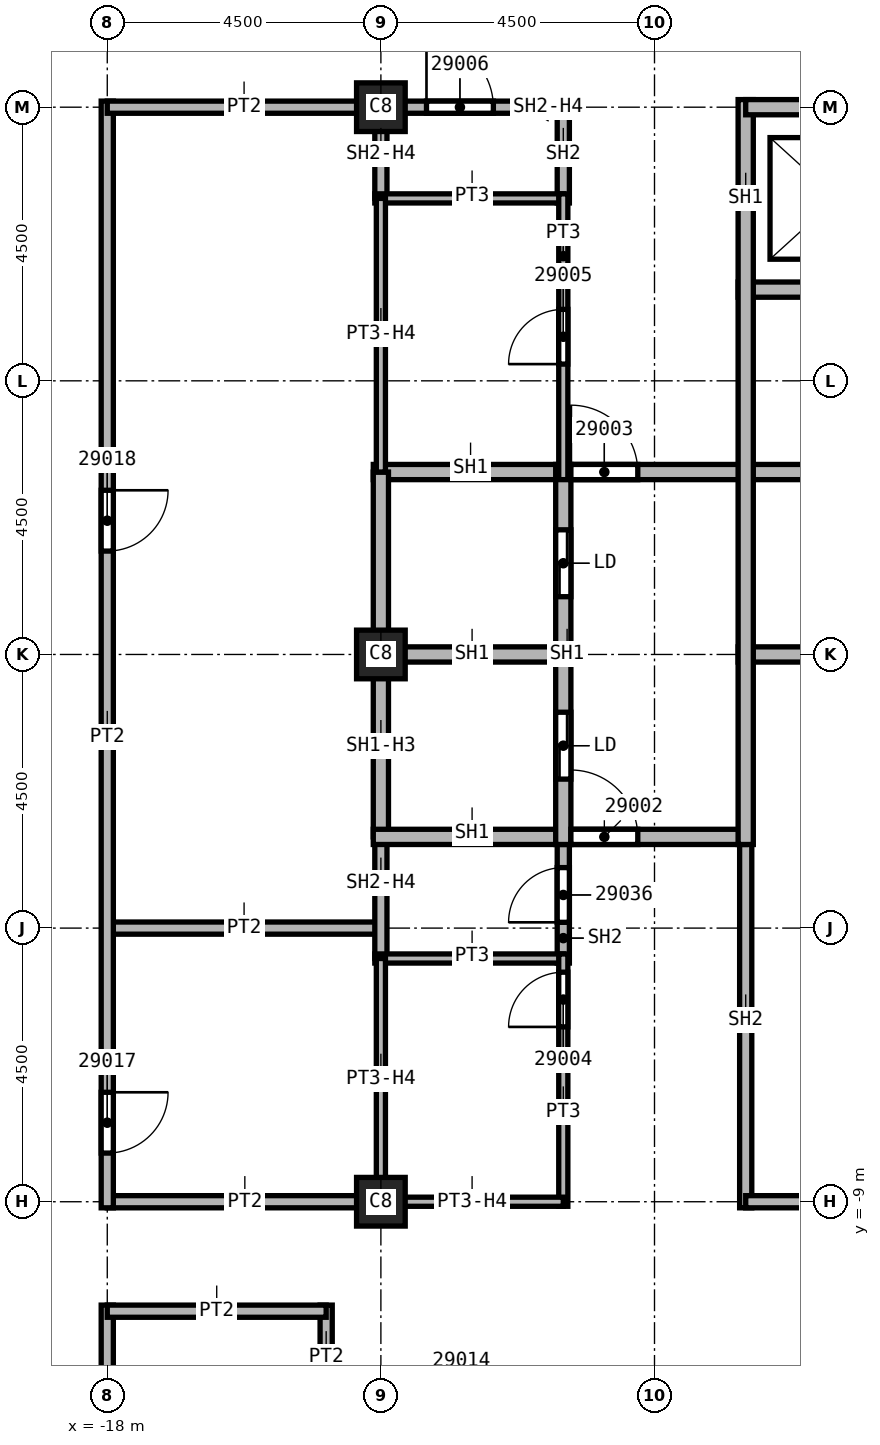
"""IFC4 building model, lengths in metres.
Left out: names, types, materials, properties, quantities, classifications, styles, units other than length and angle.
Written with IfcOpenShell. Run it as: python <this file> out.ifc"""

import sys

from ifc_helpers import new_model, si_unit, direction, frame, frame_2d, origin, origin_2d, place, context, subcontext, project, spatial, rectangle, extrude, element, fill, save


model = new_model("IFC4")
c1 = context("Model", 3, precision=1e-05, world=origin(), true_north=direction((0.0, 1.0)))
c2 = subcontext(c1, "Body", "Model", "MODEL_VIEW")
j1 = project(units=[si_unit("LENGTHUNIT", "METRE"), si_unit("PLANEANGLEUNIT", "RADIAN")], contexts=[c1])
p1 = place(None, origin())
s1 = spatial("IfcSite", under=j1, at=p1, CompositionType="ELEMENT")
p2 = place(p1, origin())
s2 = spatial("IfcBuilding", under=s1, at=p2, CompositionType="ELEMENT")
p3 = place(p2, frame((0.0, 0.0, 294.0)))
s3 = spatial("IfcBuildingStorey", under=s2, at=p3, CompositionType="ELEMENT", Elevation=294.0)
for number, where, z_axis, x_axis in (
    (1, (-13.5, 0.0, 0.0), (0.0, 0.0, 1.0), (1.0, 0.0, 0.0)),
    (2, (-13.5, 9.0, 0.0), (0.0, 0.0, 1.0), (1.0, 0.0, 0.0)),
    (3, (-13.5, -9.0, 0.0), (0.0, 0.0, 1.0), (1.0, 0.0, 0.0)),
):
    element("IfcColumn", number, at=place(p3, frame(where, z_axis=z_axis, x_axis=x_axis)), inside=s3, PredefinedType="COLUMN", context=c2, shape_type="SweptSolid", body=[
        extrude(rectangle(XDim=0.8, YDim=0.8, at=origin_2d()), origin(), (0.0, 0.0, 1.0), 5.74),
    ])
p4 = place(p3, frame((-18.0, -10.7, 0.0), z_axis=(0.0, 0.0, 1.0), x_axis=(0.0, -1.0, 0.0)))
e4 = element("IfcWall", 4, at=p4, inside=s3, PredefinedType="PARTITIONING", context=c2, shape_type="SweptSolid", body=[
    extrude(rectangle(XDim=11.2, YDim=0.2, at=frame_2d((5.6, 0.0))), origin(), (0.0, 0.0, 1.0), 5.74),
])
for number, where, z_axis, x_axis in (
    (5, (-18.0, -9.0, 0.0), (0.0, 0.0, 1.0), (1.0, 0.0, 0.0)),
    (6, (-18.0, -4.5, 0.0), (0.0, 0.0, 1.0), (1.0, 0.0, 0.0)),
):
    element("IfcWall", number, at=place(p3, frame(where, z_axis=z_axis, x_axis=x_axis)), inside=s3, PredefinedType="PARTITIONING", context=c2, shape_type="SweptSolid", body=[
        extrude(rectangle(XDim=4.5, YDim=0.2, at=frame_2d((2.25, 0.0))), origin(), (0.0, 0.0, 1.0), 5.74),
    ])
p5 = place(p3, frame((-18.0, 9.1, 0.0), z_axis=(0.0, 0.0, 1.0), x_axis=(0.0, -1.0, 0.0)))
e7 = element("IfcWall", 7, at=p5, inside=s3, PredefinedType="PARTITIONING", context=c2, shape_type="SweptSolid", body=[
    extrude(rectangle(XDim=18.2, YDim=0.2, at=frame_2d((9.1, 0.0))), origin(), (0.0, 0.0, 1.0), 5.74),
])
p6 = place(p5, frame((16.3, 0.0, 0.0)))
e8 = element("IfcOpeningElement", 8, at=p6, cuts=e7, PredefinedType="OPENING", context=c2, shape_type="SweptSolid", body=[
    extrude(rectangle(XDim=1.0, YDim=2.1, at=frame_2d((0.5, 1.05))), frame((0.0, 0.1, 0.0), z_axis=(0.0, -1.0, 0.0), x_axis=(1.0, 0.0, 0.0)), (0.0, 0.0, 1.0), 0.2),
])
p7 = place(p5, frame((6.4, 0.0, 0.0)))
e9 = element("IfcOpeningElement", 9, at=p7, cuts=e7, PredefinedType="OPENING", context=c2, shape_type="SweptSolid", body=[
    extrude(rectangle(XDim=1.0, YDim=2.1, at=frame_2d((0.5, 1.05))), frame((0.0, 0.1, 0.0), z_axis=(0.0, -1.0, 0.0), x_axis=(1.0, 0.0, 0.0)), (0.0, 0.0, 1.0), 0.2),
])
p8 = place(p3, frame((-14.4, -12.3, 0.0), z_axis=(0.0, 0.0, 1.0), x_axis=(0.0, 1.0, 0.0)))
e10 = element("IfcWall", 10, at=p8, inside=s3, PredefinedType="PARTITIONING", context=c2, shape_type="SweptSolid", body=[
    extrude(rectangle(XDim=1.6, YDim=0.2, at=frame_2d((0.8, 0.0))), origin(), (0.0, 0.0, 1.0), 5.74),
])
p9 = place(p3, frame((-14.4, -10.8, 0.0), z_axis=(0.0, 0.0, 1.0), x_axis=(-1.0, 0.0, 0.0)))
e11 = element("IfcWall", 11, at=p9, inside=s3, PredefinedType="PARTITIONING", context=c2, shape_type="SweptSolid", body=[
    extrude(rectangle(XDim=3.6, YDim=0.2, at=frame_2d((1.8, 0.0))), origin(), (0.0, 0.0, 1.0), 5.74),
])
p10 = place(p3, frame((-13.5, 9.0, 0.0), z_axis=(0.0, 0.0, 1.0), x_axis=(-1.0, 0.0, 0.0)))
e12 = element("IfcWall", 12, at=p10, inside=s3, PredefinedType="PARTITIONING", context=c2, shape_type="SweptSolid", body=[
    extrude(rectangle(XDim=4.5, YDim=0.2, at=frame_2d((2.25, 0.0))), origin(), (0.0, 0.0, 1.0), 5.74),
])
p11 = place(p3, frame((-13.6, 9.0, 0.0), z_axis=(0.0, 0.0, 1.0), x_axis=(1.0, 0.0, 0.0)))
e13 = element("IfcWall", 13, at=p11, inside=s3, PredefinedType="SOLIDWALL", context=c2, shape_type="SweptSolid", body=[
    extrude(rectangle(XDim=3.1, YDim=0.2, at=frame_2d((1.55, 0.0))), origin(), (0.0, 0.0, 1.0), 5.062),
])
p12 = place(p11, frame((0.85, 0.0, 0.0)))
e14 = element("IfcOpeningElement", 14, at=p12, cuts=e13, PredefinedType="OPENING", context=c2, shape_type="SweptSolid", body=[
    extrude(rectangle(XDim=1.1, YDim=2.1, at=frame_2d((0.55, 1.05))), frame((0.0, 0.1, 0.0), z_axis=(0.0, -1.0, 0.0), x_axis=(1.0, 0.0, 0.0)), (0.0, 0.0, 1.0), 0.2),
])
p13 = place(p3, frame((-13.5, -5.0, 0.0), z_axis=(0.0, 0.0, 1.0), x_axis=(0.0, 1.0, 0.0)))
e15 = element("IfcWall", 15, at=p13, inside=s3, PredefinedType="SOLIDWALL", context=c2, shape_type="SweptSolid", body=[
    extrude(rectangle(XDim=2.0, YDim=0.2, at=frame_2d((1.0, 0.0))), origin(), (0.0, 0.0, 1.0), 5.062),
])
p14 = place(p3, frame((-13.5, 7.5, 0.0), z_axis=(0.0, 0.0, 1.0), x_axis=(0.0, 1.0, 0.0)))
e16 = element("IfcWall", 16, at=p14, inside=s3, PredefinedType="SOLIDWALL", context=c2, shape_type="SweptSolid", body=[
    extrude(rectangle(XDim=1.6, YDim=0.2, at=frame_2d((0.8, 0.0))), origin(), (0.0, 0.0, 1.0), 5.062),
])
p15 = place(p3, frame((-10.5, -5.075, 0.0), z_axis=(0.0, 0.0, 1.0), x_axis=(0.0, 1.0, 0.0)))
e17 = element("IfcWall", 17, at=p15, inside=s3, PredefinedType="SOLIDWALL", context=c2, shape_type="SweptSolid", body=[
    extrude(rectangle(XDim=2.2, YDim=0.2, at=frame_2d((1.1, 0.0))), origin(), (0.0, 0.0, 1.0), 5.74),
])
p16 = place(p15, frame((0.67, 0.0, 0.0)))
e18 = element("IfcOpeningElement", 18, at=p16, cuts=e17, PredefinedType="OPENING", context=c2, shape_type="SweptSolid", body=[
    extrude(rectangle(XDim=0.9, YDim=2.1, at=frame_2d((0.45, 1.05))), frame((0.0, 0.1, 0.0), z_axis=(0.0, -1.0, 0.0), x_axis=(1.0, 0.0, 0.0)), (0.0, 0.0, 1.0), 0.2),
])
p17 = place(p3, frame((-10.5, 7.425, 0.0), z_axis=(0.0, 0.0, 1.0), x_axis=(0.0, 1.0, 0.0)))
e19 = element("IfcWall", 19, at=p17, inside=s3, PredefinedType="SOLIDWALL", context=c2, shape_type="SweptSolid", body=[
    extrude(rectangle(XDim=1.675, YDim=0.2, at=frame_2d((0.837, 0.0))), origin(), (0.0, 0.0, 1.0), 5.74),
])
p18 = place(p3, frame((-7.5, -9.1, 0.0), z_axis=(0.0, 0.0, 1.0), x_axis=(0.0, 1.0, 0.0)))
e20 = element("IfcWall", 20, at=p18, inside=s3, PredefinedType="SOLIDWALL", context=c2, shape_type="SweptSolid", body=[
    extrude(rectangle(XDim=6.225, YDim=0.2, at=frame_2d((3.113, 0.0))), origin(), (0.0, 0.0, 1.0), 5.74),
])
p19 = place(p3, frame((-4.5, -9.0, 0.0), z_axis=(0.0, 0.0, 1.0), x_axis=(-1.0, 0.0, 0.0)))
e21 = element("IfcWall", 21, at=p19, inside=s3, PredefinedType="SOLIDWALL", context=c2, shape_type="SweptSolid", body=[
    extrude(rectangle(XDim=3.0, YDim=0.2, at=frame_2d((1.5, 0.0))), origin(), (0.0, 0.0, 1.0), 5.062),
])
p20 = place(p3, frame((-13.625, 0.0, 0.0), z_axis=(0.0, 0.0, 1.0), x_axis=(1.0, 0.0, 0.0)))
e22 = element("IfcWall", 22, at=p20, inside=s3, PredefinedType="SOLIDWALL", context=c2, shape_type="SweptSolid", body=[
    extrude(rectangle(XDim=3.125, YDim=0.25, at=frame_2d((1.562, 0.0))), origin(), (0.0, 0.0, 1.0), 5.74),
])
p21 = place(p3, frame((-13.625, 3.0, 0.0), z_axis=(0.0, 0.0, 1.0), x_axis=(1.0, 0.0, 0.0)))
e23 = element("IfcWall", 23, at=p21, inside=s3, PredefinedType="SOLIDWALL", context=c2, shape_type="SweptSolid", body=[
    extrude(rectangle(XDim=9.25, YDim=0.25, at=frame_2d((4.625, 0.0))), origin(), (0.0, 0.0, 1.0), 5.74),
])
p22 = place(p21, frame((3.25, 0.0, 0.0)))
e24 = element("IfcOpeningElement", 24, at=p22, cuts=e23, PredefinedType="OPENING", context=c2, shape_type="SweptSolid", body=[
    extrude(rectangle(XDim=1.1, YDim=2.1, at=frame_2d((0.55, 1.05))), frame((0.0, 0.125, 0.0), z_axis=(0.0, -1.0, 0.0), x_axis=(1.0, 0.0, 0.0)), (0.0, 0.0, 1.0), 0.25),
])
p23 = place(p3, frame((-13.5, -3.0, 0.0), z_axis=(0.0, 0.0, 1.0), x_axis=(0.0, 1.0, 0.0)))
e25 = element("IfcWall", 25, at=p23, inside=s3, PredefinedType="SOLIDWALL", context=c2, shape_type="SweptSolid", body=[
    extrude(rectangle(XDim=6.0, YDim=0.25, at=frame_2d((3.0, 0.0))), origin(), (0.0, 0.0, 1.0), 5.062),
])
p24 = place(p3, frame((-13.625, -3.0, 0.0), z_axis=(0.0, 0.0, 1.0), x_axis=(1.0, 0.0, 0.0)))
e26 = element("IfcWall", 26, at=p24, inside=s3, PredefinedType="SOLIDWALL", context=c2, shape_type="SweptSolid", body=[
    extrude(rectangle(XDim=6.125, YDim=0.25, at=frame_2d((3.062, 0.0))), origin(), (0.0, 0.0, 1.0), 5.74),
])
p25 = place(p24, frame((3.25, 0.0, 0.0)))
e27 = element("IfcOpeningElement", 27, at=p25, cuts=e26, PredefinedType="OPENING", context=c2, shape_type="SweptSolid", body=[
    extrude(rectangle(XDim=1.1, YDim=2.1, at=frame_2d((0.55, 1.05))), frame((0.0, 0.125, 0.0), z_axis=(0.0, -1.0, 0.0), x_axis=(1.0, 0.0, 0.0)), (0.0, 0.0, 1.0), 0.25),
])
p26 = place(p3, frame((-10.5, -3.125, 0.0), z_axis=(0.0, 0.0, 1.0), x_axis=(0.0, 1.0, 0.0)))
e28 = element("IfcWall", 28, at=p26, inside=s3, PredefinedType="SOLIDWALL", context=c2, shape_type="SweptSolid", body=[
    extrude(rectangle(XDim=6.25, YDim=0.25, at=frame_2d((3.125, 0.0))), origin(), (0.0, 0.0, 1.0), 5.74),
])
p27 = place(p26, frame((1.075, 0.0, 0.0)))
e29 = element("IfcOpeningElement", 29, at=p27, cuts=e28, PredefinedType="OPENING", context=c2, shape_type="SweptSolid", body=[
    extrude(rectangle(XDim=1.1, YDim=2.1, at=frame_2d((0.55, 1.05))), frame((0.0, 0.125, 0.0), z_axis=(0.0, -1.0, 0.0), x_axis=(1.0, 0.0, 0.0)), (0.0, 0.0, 1.0), 0.25),
])
p28 = place(p26, frame((4.075, 0.0, 0.0)))
e30 = element("IfcOpeningElement", 30, at=p28, cuts=e28, PredefinedType="OPENING", context=c2, shape_type="SweptSolid", body=[
    extrude(rectangle(XDim=1.1, YDim=2.1, at=frame_2d((0.55, 1.05))), frame((0.0, 0.125, 0.0), z_axis=(0.0, -1.0, 0.0), x_axis=(1.0, 0.0, 0.0)), (0.0, 0.0, 1.0), 0.25),
])
for number, where, z_axis, x_axis in (
    (31, (-7.625, 0.0, 0.0), (0.0, 0.0, 1.0), (1.0, 0.0, 0.0)),
    (32, (-7.625, 6.0, 0.0), (0.0, 0.0, 1.0), (1.0, 0.0, 0.0)),
):
    element("IfcWall", number, at=place(p3, frame(where, z_axis=z_axis, x_axis=x_axis)), inside=s3, PredefinedType="SOLIDWALL", context=c2, shape_type="SweptSolid", body=[
        extrude(rectangle(XDim=3.25, YDim=0.25, at=frame_2d((1.625, 0.0))), origin(), (0.0, 0.0, 1.0), 5.74),
    ])
p29 = place(p3, frame((-7.5, -3.125, 0.0), z_axis=(0.0, 0.0, 1.0), x_axis=(0.0, 1.0, 0.0)))
e33 = element("IfcWall", 33, at=p29, inside=s3, PredefinedType="SOLIDWALL", context=c2, shape_type="SweptSolid", body=[
    extrude(rectangle(XDim=12.25, YDim=0.25, at=frame_2d((6.125, 0.0))), origin(), (0.0, 0.0, 1.0), 5.74),
])
p30 = place(p3, frame((-7.5, 9.0, 0.0), z_axis=(0.0, 0.0, 1.0), x_axis=(1.0, 0.0, 0.0)))
e34 = element("IfcWall", 34, at=p30, inside=s3, PredefinedType="SOLIDWALL", context=c2, shape_type="SweptSolid", body=[
    extrude(rectangle(XDim=3.0, YDim=0.25, at=frame_2d((1.5, 0.0))), origin(), (0.0, 0.0, 1.0), 5.062),
])
for number, where, z_axis, x_axis in (
    (35, (-13.6, -5.0, 0.0), (0.0, 0.0, 1.0), (1.0, 0.0, 0.0)),
    (36, (-13.6, 7.5, 0.0), (0.0, 0.0, 1.0), (1.0, 0.0, 0.0)),
):
    element("IfcWall", number, at=place(p3, frame(where, z_axis=z_axis, x_axis=x_axis)), inside=s3, PredefinedType="PARTITIONING", context=c2, shape_type="SweptSolid", body=[
        extrude(rectangle(XDim=3.1, YDim=0.15, at=frame_2d((1.55, 0.0))), origin(), (0.0, 0.0, 1.0), 5.74),
    ])
p31 = place(p3, frame((-13.5, -9.1, 0.0), z_axis=(0.0, 0.0, 1.0), x_axis=(0.0, 1.0, 0.0)))
e37 = element("IfcWall", 37, at=p31, inside=s3, PredefinedType="PARTITIONING", context=c2, shape_type="SweptSolid", body=[
    extrude(rectangle(XDim=4.1, YDim=0.15, at=frame_2d((2.05, 0.0))), origin(), (0.0, 0.0, 1.0), 5.062),
])
p32 = place(p3, frame((-13.5, 3.0, 0.0), z_axis=(0.0, 0.0, 1.0), x_axis=(0.0, 1.0, 0.0)))
e38 = element("IfcWall", 38, at=p32, inside=s3, PredefinedType="PARTITIONING", context=c2, shape_type="SweptSolid", body=[
    extrude(rectangle(XDim=4.5, YDim=0.15, at=frame_2d((2.25, 0.0))), origin(), (0.0, 0.0, 1.0), 5.062),
])
p33 = place(p3, frame((-10.5, -9.075, 0.0), z_axis=(0.0, 0.0, 1.0), x_axis=(0.0, 1.0, 0.0)))
e39 = element("IfcWall", 39, at=p33, inside=s3, PredefinedType="PARTITIONING", context=c2, shape_type="SweptSolid", body=[
    extrude(rectangle(XDim=4.15, YDim=0.15, at=frame_2d((2.075, 0.0))), origin(), (0.0, 0.0, 1.0), 5.74),
])
p34 = place(p33, frame((2.95, 0.0, 0.0)))
e40 = element("IfcOpeningElement", 40, at=p34, cuts=e39, PredefinedType="OPENING", context=c2, shape_type="SweptSolid", body=[
    extrude(rectangle(XDim=0.9, YDim=2.1, at=frame_2d((0.45, 1.05))), frame((0.0, 0.075, 0.0), z_axis=(0.0, -1.0, 0.0), x_axis=(1.0, 0.0, 0.0)), (0.0, 0.0, 1.0), 0.15),
])
p35 = place(p3, frame((-10.5, -9.0, 0.0), z_axis=(0.0, 0.0, 1.0), x_axis=(-1.0, 0.0, 0.0)))
e41 = element("IfcWall", 41, at=p35, inside=s3, PredefinedType="PARTITIONING", context=c2, shape_type="SweptSolid", body=[
    extrude(rectangle(XDim=3.075, YDim=0.15, at=frame_2d((1.538, 0.0))), origin(), (0.0, 0.0, 1.0), 5.062),
])
p36 = place(p3, frame((-10.5, 2.875, 0.0), z_axis=(0.0, 0.0, 1.0), x_axis=(0.0, 1.0, 0.0)))
e42 = element("IfcWall", 42, at=p36, inside=s3, PredefinedType="PARTITIONING", context=c2, shape_type="SweptSolid", body=[
    extrude(rectangle(XDim=4.7, YDim=0.15, at=frame_2d((2.35, 0.0))), origin(), (0.0, 0.0, 1.0), 5.74),
])
p37 = place(p36, frame((1.9, 0.0, 0.0)))
e43 = element("IfcOpeningElement", 43, at=p37, cuts=e42, PredefinedType="OPENING", context=c2, shape_type="SweptSolid", body=[
    extrude(rectangle(XDim=0.9, YDim=2.1, at=frame_2d((0.45, 1.05))), frame((0.0, 0.075, 0.0), z_axis=(0.0, -1.0, 0.0), x_axis=(1.0, 0.0, 0.0)), (0.0, 0.0, 1.0), 0.15),
])
p38 = place(p25, origin())
e44 = element("IfcDoor", 44, at=p38, inside=s3, OperationType="SINGLE_SWING_LEFT", PredefinedType="DOOR", context=c2, shape_type="SweptSolid", body=[
    extrude(rectangle(XDim=1.1, YDim=2.1, at=frame_2d((0.55, 1.05))), frame((0.0, 0.025, 0.0), z_axis=(0.0, -1.0, 0.0), x_axis=(1.0, 0.0, 0.0)), (0.0, 0.0, 1.0), 0.05),
])
fill(e27, e44)
p39 = place(p22, origin())
e45 = element("IfcDoor", 45, at=p39, inside=s3, OperationType="SINGLE_SWING_RIGHT", PredefinedType="DOOR", context=c2, shape_type="SweptSolid", body=[
    extrude(rectangle(XDim=1.1, YDim=2.1, at=frame_2d((0.55, 1.05))), frame((0.0, 0.025, 0.0), z_axis=(0.0, -1.0, 0.0), x_axis=(1.0, 0.0, 0.0)), (0.0, 0.0, 1.0), 0.05),
])
fill(e24, e45)
p40 = place(p34, origin())
e46 = element("IfcDoor", 46, at=p40, inside=s3, OperationType="SINGLE_SWING_LEFT", PredefinedType="DOOR", context=c2, shape_type="SweptSolid", body=[
    extrude(rectangle(XDim=0.9, YDim=2.1, at=frame_2d((0.45, 1.05))), frame((0.0, 0.025, 0.0), z_axis=(0.0, -1.0, 0.0), x_axis=(1.0, 0.0, 0.0)), (0.0, 0.0, 1.0), 0.05),
])
fill(e40, e46)
p41 = place(p37, origin())
e47 = element("IfcDoor", 47, at=p41, inside=s3, OperationType="SINGLE_SWING_RIGHT", PredefinedType="DOOR", context=c2, shape_type="SweptSolid", body=[
    extrude(rectangle(XDim=0.9, YDim=2.1, at=frame_2d((0.45, 1.05))), frame((0.0, 0.025, 0.0), z_axis=(0.0, -1.0, 0.0), x_axis=(1.0, 0.0, 0.0)), (0.0, 0.0, 1.0), 0.05),
])
fill(e43, e47)
p42 = place(p12, origin())
e48 = element("IfcDoor", 48, at=p42, inside=s3, OperationType="SINGLE_SWING_LEFT", PredefinedType="DOOR", context=c2, shape_type="SweptSolid", body=[
    extrude(rectangle(XDim=1.1, YDim=2.1, at=frame_2d((0.55, 1.05))), frame((0.0, 0.025, 0.0), z_axis=(0.0, -1.0, 0.0), x_axis=(1.0, 0.0, 0.0)), (0.0, 0.0, 1.0), 0.05),
])
fill(e14, e48)
p43 = place(p6, origin())
e49 = element("IfcDoor", 49, at=p43, inside=s3, OperationType="SINGLE_SWING_RIGHT", PredefinedType="DOOR", context=c2, shape_type="SweptSolid", body=[
    extrude(rectangle(XDim=1.0, YDim=2.1, at=frame_2d((0.5, 1.05))), frame((0.0, 0.025, 0.0), z_axis=(0.0, -1.0, 0.0), x_axis=(1.0, 0.0, 0.0)), (0.0, 0.0, 1.0), 0.05),
])
fill(e8, e49)
p44 = place(p7, origin())
e50 = element("IfcDoor", 50, at=p44, inside=s3, OperationType="SINGLE_SWING_LEFT", PredefinedType="DOOR", context=c2, shape_type="SweptSolid", body=[
    extrude(rectangle(XDim=1.0, YDim=2.1, at=frame_2d((0.5, 1.05))), frame((0.0, 0.025, 0.0), z_axis=(0.0, -1.0, 0.0), x_axis=(1.0, 0.0, 0.0)), (0.0, 0.0, 1.0), 0.05),
])
fill(e9, e50)
p45 = place(p16, origin())
e51 = element("IfcDoor", 51, at=p45, inside=s3, OperationType="SINGLE_SWING_LEFT", PredefinedType="DOOR", context=c2, shape_type="SweptSolid", body=[
    extrude(rectangle(XDim=0.9, YDim=2.1, at=frame_2d((0.45, 1.05))), frame((0.0, 0.025, 0.0), z_axis=(0.0, -1.0, 0.0), x_axis=(1.0, 0.0, 0.0)), (0.0, 0.0, 1.0), 0.05),
])
fill(e18, e51)
p46 = place(p27, origin())
e52 = element("IfcDoor", 52, at=p46, inside=s3, OperationType="SLIDING_TO_LEFT", PredefinedType="DOOR", context=c2, shape_type="SweptSolid", body=[
    extrude(rectangle(XDim=1.1, YDim=2.1, at=frame_2d((0.55, 1.05))), frame((0.0, 0.025, 0.0), z_axis=(0.0, -1.0, 0.0), x_axis=(1.0, 0.0, 0.0)), (0.0, 0.0, 1.0), 0.05),
])
fill(e29, e52)
p47 = place(p28, origin())
e53 = element("IfcDoor", 53, at=p47, inside=s3, OperationType="SLIDING_TO_LEFT", PredefinedType="DOOR", context=c2, shape_type="SweptSolid", body=[
    extrude(rectangle(XDim=1.1, YDim=2.1, at=frame_2d((0.55, 1.05))), frame((0.0, 0.025, 0.0), z_axis=(0.0, -1.0, 0.0), x_axis=(1.0, 0.0, 0.0)), (0.0, 0.0, 1.0), 0.05),
])
fill(e30, e53)
save(model, sys.argv[1])
